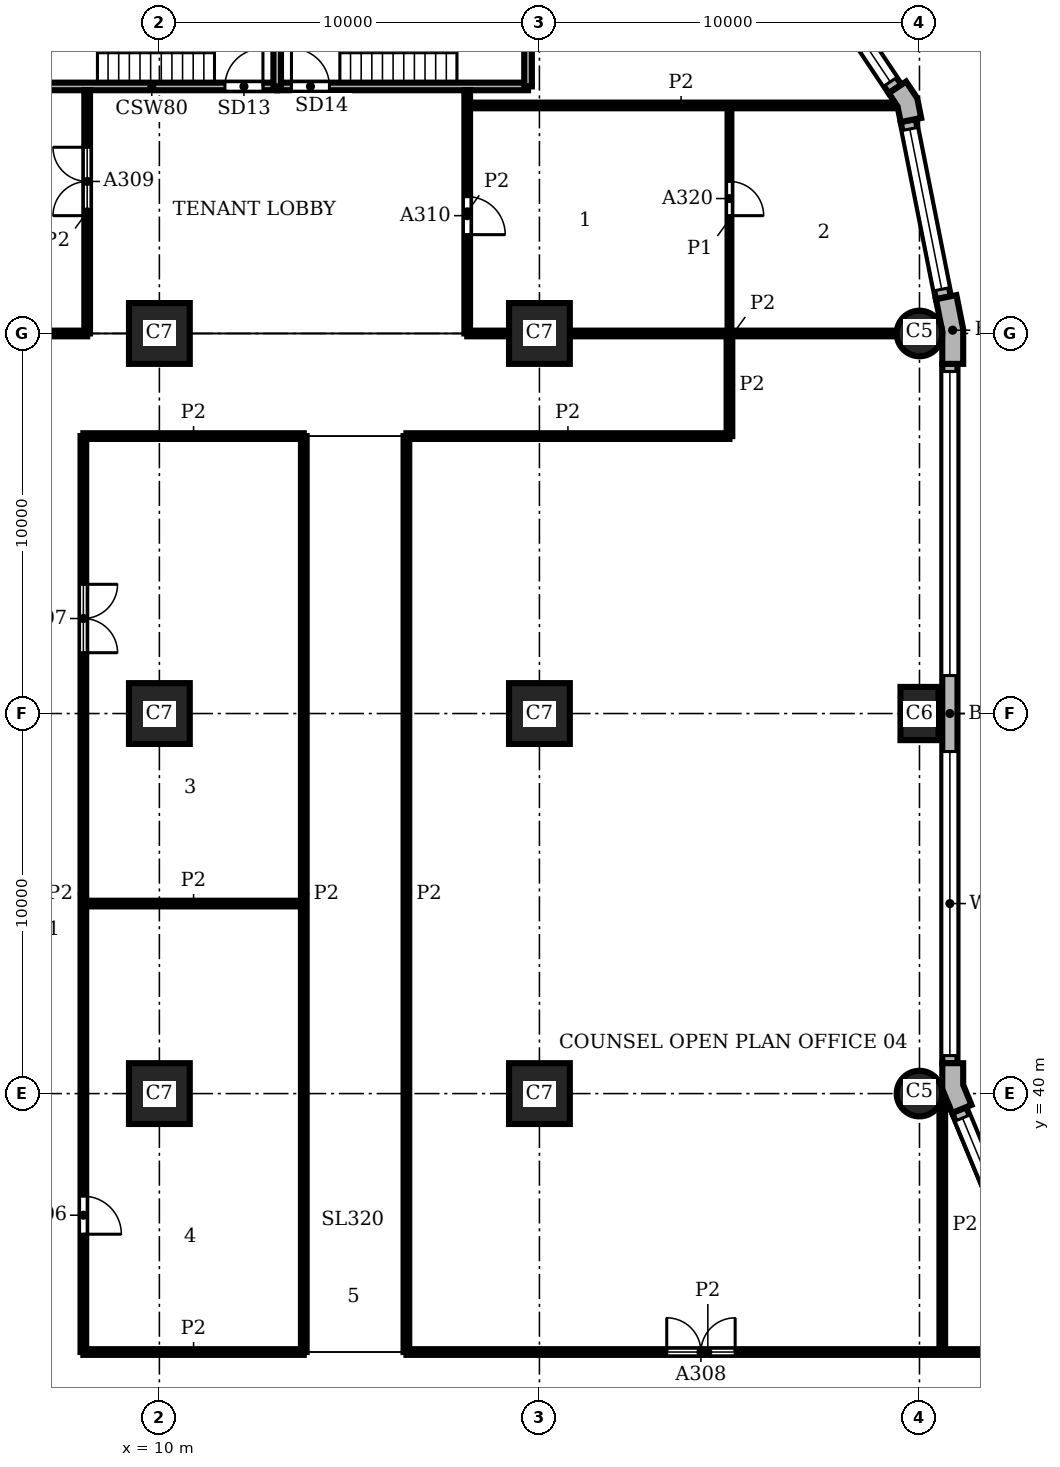
"""IFC4 building model, lengths in metres.
Left out: names, types, materials, properties, quantities, classifications, styles, units other than length and angle.
Written with IfcOpenShell. Run it as: python <this file> out.ifc"""

import sys

from ifc_helpers import new_model, si_unit, direction, frame, frame_2d, origin, origin_2d, place, context, subcontext, project, spatial, polyline, rectangle, circle, outline, extrude, element, fill, save


model = new_model("IFC4")
c1 = context("Model", 3, precision=1e-05, world=origin(), true_north=direction((0.0, 1.0)))
c2 = subcontext(c1, "Body", "Model", "MODEL_VIEW")
j1 = project(units=[si_unit("LENGTHUNIT", "METRE"), si_unit("PLANEANGLEUNIT", "RADIAN")], contexts=[c1])
p1 = place(None, origin())
s1 = spatial("IfcSite", under=j1, at=p1, CompositionType="ELEMENT")
p2 = place(p1, origin())
s2 = spatial("IfcBuilding", under=s1, at=p2, CompositionType="ELEMENT")
p3 = place(p2, frame((0.0, 0.0, 43.2)))
s3 = spatial("IfcBuildingStorey", under=s2, at=p3, CompositionType="ELEMENT", Elevation=43.2)
p4 = place(p3, frame((30.0, 40.0, 0.0), z_axis=(0.0, 0.0, 1.0), x_axis=(1.0, 0.0, 0.0)))
e1 = element("IfcColumn", 1, at=p4, inside=s3, PredefinedType="COLUMN", context=c2, shape_type="SweptSolid", body=[
    extrude(circle(Radius=0.6, at=origin_2d()), origin(), (0.0, 0.0, 1.0), 3.9),
])
p5 = place(p3, frame((30.0, 50.0, 0.0), z_axis=(0.0, 0.0, 1.0), x_axis=(0.0, 1.0, 0.0)))
e2 = element("IfcColumn", 2, at=p5, inside=s3, PredefinedType="COLUMN", context=c2, shape_type="SweptSolid", body=[
    extrude(rectangle(XDim=1.4, YDim=1.0, at=origin_2d()), origin(), (0.0, 0.0, 1.0), 3.9),
])
p6 = place(p3, frame((30.0, 60.0, 0.0), z_axis=(0.0, 0.0, 1.0), x_axis=(1.0, 0.0, 0.0)))
e3 = element("IfcColumn", 3, at=p6, inside=s3, PredefinedType="COLUMN", context=c2, shape_type="SweptSolid", body=[
    extrude(circle(Radius=0.6, at=origin_2d()), origin(), (0.0, 0.0, 1.0), 3.9),
])
for number, where, z_axis, x_axis in (
    (4, (10.0, 40.0, 0.0), (0.0, 0.0, 1.0), (1.0, 0.0, 0.0)),
    (5, (10.0, 50.0, 0.0), (0.0, 0.0, 1.0), (1.0, 0.0, 0.0)),
    (6, (10.0, 60.0, 0.0), (0.0, 0.0, 1.0), (1.0, 0.0, 0.0)),
    (7, (20.0, 40.0, 0.0), (0.0, 0.0, 1.0), (1.0, 0.0, 0.0)),
    (8, (20.0, 50.0, 0.0), (0.0, 0.0, 1.0), (1.0, 0.0, 0.0)),
    (9, (20.0, 60.0, 0.0), (0.0, 0.0, 1.0), (1.0, 0.0, 0.0)),
):
    element("IfcColumn", number, at=place(p3, frame(where, z_axis=z_axis, x_axis=x_axis)), inside=s3, PredefinedType="COLUMN", context=c2, shape_type="SweptSolid", body=[
        extrude(rectangle(XDim=1.6, YDim=1.6, at=origin_2d()), origin(), (0.0, 0.0, 1.0), 3.9),
    ])
p7 = place(p3, origin())
e10 = element("IfcWall", 10, at=p7, inside=s3, PredefinedType="SOLIDWALL", context=c2, shape_type="SweptSolid", body=[
    extrude(outline(polyline([(31.23, 39.644), (31.369, 39.701), (31.15, 40.229), (31.15, 40.8), (31.0, 40.8), (30.6, 40.8), (30.6, 40.119), (30.861, 39.49), (31.23, 39.644)])), origin(), (0.0, 0.0, 1.0), 3.9),
])
e11 = element("IfcWall", 11, at=p7, inside=s3, PredefinedType="SOLIDWALL", context=c2, shape_type="SweptSolid", body=[
    extrude(outline(polyline([(31.0, 59.2), (31.15, 59.2), (31.15, 60.113), (30.972, 61.009), (30.825, 60.98), (30.432, 60.902), (30.6, 60.059), (30.6, 59.2), (31.0, 59.2)])), origin(), (0.0, 0.0, 1.0), 3.9),
])
e12 = element("IfcWall", 12, at=p7, inside=s3, PredefinedType="SOLIDWALL", context=c2, shape_type="SweptSolid", body=[
    extrude(outline(polyline([(29.897, 65.641), (30.045, 65.67), (29.941, 66.189), (29.648, 66.629), (29.523, 66.545), (29.19, 66.323), (29.423, 65.974), (29.505, 65.563), (29.897, 65.641)])), origin(), (0.0, 0.0, 1.0), 3.9),
])
p8 = place(p3, frame((33.362, 33.974, 0.0), z_axis=(0.0, 0.0, 1.0), x_axis=(-0.382655745237, 0.923891000409, 0.0)))
e13 = element("IfcWall", 13, at=p8, inside=s3, PredefinedType="SOLIDWALL", context=c2, shape_type="SweptSolid", body=[
    extrude(rectangle(XDim=6.053, YDim=0.4, at=frame_2d((3.027, 0.0))), origin(), (0.0, 0.0, 1.0), 3.9),
])
p9 = place(p8, frame((0.227, 0.0, 0.9)))
e14 = element("IfcOpeningElement", 14, at=p9, cuts=e13, PredefinedType="OPENING", context=c2, shape_type="SweptSolid", body=[
    extrude(rectangle(XDim=5.6, YDim=2.35, at=frame_2d((2.8, 1.175))), frame((0.0, 0.21, 0.0), z_axis=(0.0, -1.0, 0.0), x_axis=(1.0, 0.0, 0.0)), (0.0, 0.0, 1.0), 0.42),
])
p10 = place(p3, frame((30.8, 40.8, 0.0), z_axis=(0.0, 0.0, 1.0), x_axis=(0.0, 1.0, 0.0)))
e15 = element("IfcWall", 15, at=p10, inside=s3, PredefinedType="SOLIDWALL", context=c2, shape_type="SweptSolid", body=[
    extrude(rectangle(XDim=18.4, YDim=0.4, at=frame_2d((9.2, 0.0))), origin(), (0.0, 0.0, 1.0), 3.9),
])
p11 = place(p10, frame((0.2, 0.0, 0.9)))
e16 = element("IfcOpeningElement", 16, at=p11, cuts=e15, PredefinedType="OPENING", context=c2, shape_type="SweptSolid", body=[
    extrude(rectangle(XDim=8.0, YDim=2.35, at=frame_2d((4.0, 1.175))), frame((0.0, 0.21, 0.0), z_axis=(0.0, -1.0, 0.0), x_axis=(1.0, 0.0, 0.0)), (0.0, 0.0, 1.0), 0.42),
])
p12 = place(p10, frame((10.2, 0.0, 0.9)))
e17 = element("IfcOpeningElement", 17, at=p12, cuts=e15, PredefinedType="OPENING", context=c2, shape_type="SweptSolid", body=[
    extrude(rectangle(XDim=8.0, YDim=2.35, at=frame_2d((4.0, 1.175))), frame((0.0, 0.21, 0.0), z_axis=(0.0, -1.0, 0.0), x_axis=(1.0, 0.0, 0.0)), (0.0, 0.0, 1.0), 0.42),
])
p13 = place(p3, frame((30.629, 60.941, 0.0), z_axis=(0.0, 0.0, 1.0), x_axis=(-0.195098533057, 0.98078364709, 0.0)))
e18 = element("IfcWall", 18, at=p13, inside=s3, PredefinedType="SOLIDWALL", context=c2, shape_type="SweptSolid", body=[
    extrude(rectangle(XDim=4.753, YDim=0.4, at=frame_2d((2.376, 0.0))), origin(), (0.0, 0.0, 1.0), 3.9),
])
p14 = place(p13, frame((0.226, 0.0, 0.9)))
e19 = element("IfcOpeningElement", 19, at=p14, cuts=e18, PredefinedType="OPENING", context=c2, shape_type="SweptSolid", body=[
    extrude(rectangle(XDim=4.3, YDim=2.35, at=frame_2d((2.15, 1.175))), frame((0.0, 0.21, 0.0), z_axis=(0.0, -1.0, 0.0), x_axis=(1.0, 0.0, 0.0)), (0.0, 0.0, 1.0), 0.42),
])
p15 = place(p3, frame((29.357, 66.434, 0.0), z_axis=(0.0, 0.0, 1.0), x_axis=(-0.555541552266, 0.831488775454, 0.0)))
e20 = element("IfcWall", 20, at=p15, inside=s3, PredefinedType="SOLIDWALL", context=c2, shape_type="SweptSolid", body=[
    extrude(rectangle(XDim=4.753, YDim=0.4, at=frame_2d((2.376, 0.0))), origin(), (0.0, 0.0, 1.0), 3.9),
])
p16 = place(p15, frame((0.226, 0.0, 0.9)))
e21 = element("IfcOpeningElement", 21, at=p16, cuts=e20, PredefinedType="OPENING", context=c2, shape_type="SweptSolid", body=[
    extrude(rectangle(XDim=4.3, YDim=2.35, at=frame_2d((2.15, 1.175))), frame((0.0, 0.21, 0.0), z_axis=(0.0, -1.0, 0.0), x_axis=(1.0, 0.0, 0.0)), (0.0, 0.0, 1.0), 0.42),
])
p17 = place(p3, frame((6.5, 66.5, 0.0), z_axis=(0.0, 0.0, 1.0), x_axis=(1.0, 0.0, 0.0)))
e22 = element("IfcWall", 22, at=p17, inside=s3, PredefinedType="SHEAR", context=c2, shape_type="SweptSolid", body=[
    extrude(rectangle(XDim=6.6, YDim=0.2, at=frame_2d((3.3, 0.0))), origin(), (0.0, 0.0, 1.0), 3.58),
])
p18 = place(p17, frame((5.225, 0.0, 0.0)))
e23 = element("IfcOpeningElement", 23, at=p18, cuts=e22, PredefinedType="OPENING", context=c2, shape_type="SweptSolid", body=[
    extrude(rectangle(XDim=1.0, YDim=2.1, at=frame_2d((0.5, 1.05))), frame((0.0, 0.11, 0.0), z_axis=(0.0, -1.0, 0.0), x_axis=(1.0, 0.0, 0.0)), (0.0, 0.0, 1.0), 0.22),
])
p19 = place(p3, frame((13.1, 66.5, 0.0), z_axis=(0.0, 0.0, 1.0), x_axis=(1.0, 0.0, 0.0)))
e24 = element("IfcWall", 24, at=p19, inside=s3, PredefinedType="SHEAR", context=c2, shape_type="SweptSolid", body=[
    extrude(rectangle(XDim=6.6, YDim=0.2, at=frame_2d((3.3, 0.0))), origin(), (0.0, 0.0, 1.0), 3.58),
])
p20 = place(p19, frame((0.375, 0.0, 0.0)))
e25 = element("IfcOpeningElement", 25, at=p20, cuts=e24, PredefinedType="OPENING", context=c2, shape_type="SweptSolid", body=[
    extrude(rectangle(XDim=1.0, YDim=2.1, at=frame_2d((0.5, 1.05))), frame((0.0, 0.11, 0.0), z_axis=(0.0, -1.0, 0.0), x_axis=(1.0, 0.0, 0.0)), (0.0, 0.0, 1.0), 0.22),
])
for number, where, z_axis, x_axis in (
    (26, (13.1, 66.5, 0.0), (0.0, 0.0, 1.0), (0.0, 1.0, 0.0)),
    (27, (19.7, 66.5, 0.0), (0.0, 0.0, 1.0), (0.0, 1.0, 0.0)),
):
    element("IfcWall", number, at=place(p3, frame(where, z_axis=z_axis, x_axis=x_axis)), inside=s3, PredefinedType="SHEAR", context=c2, shape_type="SweptSolid", body=[
        extrude(rectangle(XDim=3.3, YDim=0.2, at=frame_2d((1.65, 0.0))), origin(), (0.0, 0.0, 1.0), 3.58),
    ])
p21 = place(p3, frame((25.0, 60.0, 0.0), z_axis=(0.0, 0.0, 1.0), x_axis=(0.0, 1.0, 0.0)))
e28 = element("IfcWall", 28, at=p21, inside=s3, PredefinedType="PARTITIONING", context=c2, shape_type="SweptSolid", body=[
    extrude(rectangle(XDim=6.0, YDim=0.1, at=frame_2d((3.0, 0.0))), origin(), (0.0, 0.0, 1.0), 3.58),
])
p22 = place(p21, frame((3.1, 0.0, 0.0)))
e29 = element("IfcOpeningElement", 29, at=p22, cuts=e28, PredefinedType="OPENING", context=c2, shape_type="SweptSolid", body=[
    extrude(rectangle(XDim=0.9, YDim=2.1, at=frame_2d((0.45, 1.05))), frame((0.0, 0.06, 0.0), z_axis=(0.0, -1.0, 0.0), x_axis=(1.0, 0.0, 0.0)), (0.0, 0.0, 1.0), 0.12),
])
p23 = place(p3, frame((8.0, 33.2, 0.0), z_axis=(0.0, 0.0, 1.0), x_axis=(0.0, 1.0, 0.0)))
e30 = element("IfcWall", 30, at=p23, inside=s3, PredefinedType="PARTITIONING", context=c2, shape_type="SweptSolid", body=[
    extrude(rectangle(XDim=24.1, YDim=0.15, at=frame_2d((12.05, 0.0))), origin(), (0.0, 0.0, 1.0), 3.58),
])
p24 = place(p23, frame((3.1, 0.0, 0.0)))
e31 = element("IfcOpeningElement", 31, at=p24, cuts=e30, PredefinedType="OPENING", context=c2, shape_type="SweptSolid", body=[
    extrude(rectangle(XDim=1.0, YDim=2.1, at=frame_2d((0.5, 1.05))), frame((0.0, 0.085, 0.0), z_axis=(0.0, -1.0, 0.0), x_axis=(1.0, 0.0, 0.0)), (0.0, 0.0, 1.0), 0.17),
])
p25 = place(p23, frame((18.4, 0.0, 0.0)))
e32 = element("IfcOpeningElement", 32, at=p25, cuts=e30, PredefinedType="OPENING", context=c2, shape_type="SweptSolid", body=[
    extrude(rectangle(XDim=1.8, YDim=2.1, at=frame_2d((0.9, 1.05))), frame((0.0, 0.085, 0.0), z_axis=(0.0, -1.0, 0.0), x_axis=(1.0, 0.0, 0.0)), (0.0, 0.0, 1.0), 0.17),
])
p26 = place(p3, frame((8.1, 60.0, 0.0), z_axis=(0.0, 0.0, 1.0), x_axis=(0.0, 1.0, 0.0)))
e33 = element("IfcWall", 33, at=p26, inside=s3, PredefinedType="PARTITIONING", context=c2, shape_type="SweptSolid", body=[
    extrude(rectangle(XDim=6.4, YDim=0.15, at=frame_2d((3.2, 0.0))), origin(), (0.0, 0.0, 1.0), 3.58),
])
p27 = place(p26, frame((3.1, 0.0, 0.0)))
e34 = element("IfcOpeningElement", 34, at=p27, cuts=e33, PredefinedType="OPENING", context=c2, shape_type="SweptSolid", body=[
    extrude(rectangle(XDim=1.8, YDim=2.1, at=frame_2d((0.9, 1.05))), frame((0.0, 0.085, 0.0), z_axis=(0.0, -1.0, 0.0), x_axis=(1.0, 0.0, 0.0)), (0.0, 0.0, 1.0), 0.17),
])
for number, where, z_axis, x_axis in (
    (35, (13.8, 33.2, 0.0), (0.0, 0.0, 1.0), (0.0, 1.0, 0.0)),
    (36, (16.5, 33.2, 0.0), (0.0, 0.0, 1.0), (0.0, 1.0, 0.0)),
):
    element("IfcWall", number, at=place(p3, frame(where, z_axis=z_axis, x_axis=x_axis)), inside=s3, PredefinedType="PARTITIONING", context=c2, shape_type="SweptSolid", body=[
        extrude(rectangle(XDim=24.1, YDim=0.15, at=frame_2d((12.05, 0.0))), origin(), (0.0, 0.0, 1.0), 3.58),
    ])
p28 = place(p3, frame((18.1, 60.0, 0.0), z_axis=(0.0, 0.0, 1.0), x_axis=(0.0, 1.0, 0.0)))
e37 = element("IfcWall", 37, at=p28, inside=s3, PredefinedType="PARTITIONING", context=c2, shape_type="SweptSolid", body=[
    extrude(rectangle(XDim=6.4, YDim=0.15, at=frame_2d((3.2, 0.0))), origin(), (0.0, 0.0, 1.0), 3.58),
])
p29 = place(p28, frame((2.6, 0.0, 0.0)))
e38 = element("IfcOpeningElement", 38, at=p29, cuts=e37, PredefinedType="OPENING", context=c2, shape_type="SweptSolid", body=[
    extrude(rectangle(XDim=1.0, YDim=2.1, at=frame_2d((0.5, 1.05))), frame((0.0, 0.085, 0.0), z_axis=(0.0, -1.0, 0.0), x_axis=(1.0, 0.0, 0.0)), (0.0, 0.0, 1.0), 0.17),
])
p30 = place(p3, frame((25.0, 57.3, 0.0), z_axis=(0.0, 0.0, 1.0), x_axis=(0.0, 1.0, 0.0)))
e39 = element("IfcWall", 39, at=p30, inside=s3, PredefinedType="PARTITIONING", context=c2, shape_type="SweptSolid", body=[
    extrude(rectangle(XDim=2.7, YDim=0.15, at=frame_2d((1.35, 0.0))), origin(), (0.0, 0.0, 1.0), 3.58),
])
p31 = place(p3, frame((30.6, 33.2, 0.0), z_axis=(0.0, 0.0, 1.0), x_axis=(0.0, 1.0, 0.0)))
e40 = element("IfcWall", 40, at=p31, inside=s3, PredefinedType="PARTITIONING", context=c2, shape_type="SweptSolid", body=[
    extrude(rectangle(XDim=6.699, YDim=0.15, at=frame_2d((3.35, 0.0))), origin(), (0.0, 0.0, 1.0), 3.58),
])
p32 = place(p3, frame((8.0, 33.2, 0.0), z_axis=(0.0, 0.0, 1.0), x_axis=(1.0, 0.0, 0.0)))
e41 = element("IfcWall", 41, at=p32, inside=s3, PredefinedType="PARTITIONING", context=c2, shape_type="SweptSolid", body=[
    extrude(rectangle(XDim=5.8, YDim=0.15, at=frame_2d((2.9, 0.0))), origin(), (0.0, 0.0, 1.0), 3.58),
])
p33 = place(p3, frame((16.5, 33.2, 0.0), z_axis=(0.0, 0.0, 1.0), x_axis=(1.0, 0.0, 0.0)))
e42 = element("IfcWall", 42, at=p33, inside=s3, PredefinedType="PARTITIONING", context=c2, shape_type="SweptSolid", body=[
    extrude(rectangle(XDim=15.862, YDim=0.15, at=frame_2d((7.931, 0.0))), origin(), (0.0, 0.0, 1.0), 3.58),
])
p34 = place(p33, frame((6.85, 0.0, 0.0)))
e43 = element("IfcOpeningElement", 43, at=p34, cuts=e42, PredefinedType="OPENING", context=c2, shape_type="SweptSolid", body=[
    extrude(rectangle(XDim=1.8, YDim=2.1, at=frame_2d((0.9, 1.05))), frame((0.0, 0.085, 0.0), z_axis=(0.0, -1.0, 0.0), x_axis=(1.0, 0.0, 0.0)), (0.0, 0.0, 1.0), 0.17),
])
for number, where, z_axis, x_axis in (
    (44, (8.0, 45.0, 0.0), (0.0, 0.0, 1.0), (1.0, 0.0, 0.0)),
    (45, (8.0, 57.3, 0.0), (0.0, 0.0, 1.0), (1.0, 0.0, 0.0)),
):
    element("IfcWall", number, at=place(p3, frame(where, z_axis=z_axis, x_axis=x_axis)), inside=s3, PredefinedType="PARTITIONING", context=c2, shape_type="SweptSolid", body=[
        extrude(rectangle(XDim=5.8, YDim=0.15, at=frame_2d((2.9, 0.0))), origin(), (0.0, 0.0, 1.0), 3.58),
    ])
p35 = place(p3, frame((16.5, 57.3, 0.0), z_axis=(0.0, 0.0, 1.0), x_axis=(1.0, 0.0, 0.0)))
e46 = element("IfcWall", 46, at=p35, inside=s3, PredefinedType="PARTITIONING", context=c2, shape_type="SweptSolid", body=[
    extrude(rectangle(XDim=8.5, YDim=0.15, at=frame_2d((4.25, 0.0))), origin(), (0.0, 0.0, 1.0), 3.58),
])
p36 = place(p3, frame((0.6, 60.0, 0.0), z_axis=(0.0, 0.0, 1.0), x_axis=(1.0, 0.0, 0.0)))
e47 = element("IfcWall", 47, at=p36, inside=s3, PredefinedType="PARTITIONING", context=c2, shape_type="SweptSolid", body=[
    extrude(rectangle(XDim=7.5, YDim=0.15, at=frame_2d((3.75, 0.0))), origin(), (0.0, 0.0, 1.0), 3.58),
])
p37 = place(p3, frame((18.1, 60.0, 0.0), z_axis=(0.0, 0.0, 1.0), x_axis=(1.0, 0.0, 0.0)))
e48 = element("IfcWall", 48, at=p37, inside=s3, PredefinedType="PARTITIONING", context=c2, shape_type="SweptSolid", body=[
    extrude(rectangle(XDim=1.1, YDim=0.15, at=frame_2d((0.55, 0.0))), origin(), (0.0, 0.0, 1.0), 3.58),
])
p38 = place(p3, frame((20.8, 60.0, 0.0), z_axis=(0.0, 0.0, 1.0), x_axis=(1.0, 0.0, 0.0)))
e49 = element("IfcWall", 49, at=p38, inside=s3, PredefinedType="PARTITIONING", context=c2, shape_type="SweptSolid", body=[
    extrude(rectangle(XDim=8.6, YDim=0.15, at=frame_2d((4.3, 0.0))), origin(), (0.0, 0.0, 1.0), 3.58),
])
p39 = place(p3, frame((18.1, 66.0, 0.0), z_axis=(0.0, 0.0, 1.0), x_axis=(1.0, 0.0, 0.0)))
e50 = element("IfcWall", 50, at=p39, inside=s3, PredefinedType="PARTITIONING", context=c2, shape_type="SweptSolid", body=[
    extrude(rectangle(XDim=11.256, YDim=0.15, at=frame_2d((5.628, 0.0))), origin(), (0.0, 0.0, 1.0), 3.58),
])
p40 = place(p9, origin())
e51 = element("IfcWindow", 51, at=p40, inside=s3, PartitioningType="SINGLE_PANEL", PredefinedType="WINDOW", context=c2, shape_type="SweptSolid", body=[
    extrude(rectangle(XDim=5.6, YDim=2.35, at=frame_2d((2.8, 1.175))), frame((0.0, 0.16, 0.0), z_axis=(0.0, -1.0, 0.0), x_axis=(1.0, 0.0, 0.0)), (0.0, 0.0, 1.0), 0.06),
])
fill(e14, e51)
p41 = place(p11, origin())
e52 = element("IfcWindow", 52, at=p41, inside=s3, PartitioningType="SINGLE_PANEL", PredefinedType="WINDOW", context=c2, shape_type="SweptSolid", body=[
    extrude(rectangle(XDim=8.0, YDim=2.35, at=frame_2d((4.0, 1.175))), frame((0.0, 0.16, 0.0), z_axis=(0.0, -1.0, 0.0), x_axis=(1.0, 0.0, 0.0)), (0.0, 0.0, 1.0), 0.06),
])
fill(e16, e52)
p42 = place(p12, origin())
e53 = element("IfcWindow", 53, at=p42, inside=s3, PartitioningType="SINGLE_PANEL", PredefinedType="WINDOW", context=c2, shape_type="SweptSolid", body=[
    extrude(rectangle(XDim=8.0, YDim=2.35, at=frame_2d((4.0, 1.175))), frame((0.0, 0.16, 0.0), z_axis=(0.0, -1.0, 0.0), x_axis=(1.0, 0.0, 0.0)), (0.0, 0.0, 1.0), 0.06),
])
fill(e17, e53)
p43 = place(p14, origin())
e54 = element("IfcWindow", 54, at=p43, inside=s3, PartitioningType="SINGLE_PANEL", PredefinedType="WINDOW", context=c2, shape_type="SweptSolid", body=[
    extrude(rectangle(XDim=4.3, YDim=2.35, at=frame_2d((2.15, 1.175))), frame((0.0, 0.16, 0.0), z_axis=(0.0, -1.0, 0.0), x_axis=(1.0, 0.0, 0.0)), (0.0, 0.0, 1.0), 0.06),
])
fill(e19, e54)
p44 = place(p16, origin())
e55 = element("IfcWindow", 55, at=p44, inside=s3, PartitioningType="SINGLE_PANEL", PredefinedType="WINDOW", context=c2, shape_type="SweptSolid", body=[
    extrude(rectangle(XDim=4.3, YDim=2.35, at=frame_2d((2.15, 1.175))), frame((0.0, 0.16, 0.0), z_axis=(0.0, -1.0, 0.0), x_axis=(1.0, 0.0, 0.0)), (0.0, 0.0, 1.0), 0.06),
])
fill(e21, e55)
p45 = place(p18, origin())
e56 = element("IfcDoor", 56, at=p45, inside=s3, OperationType="SINGLE_SWING_RIGHT", PredefinedType="DOOR", context=c2, shape_type="SweptSolid", body=[
    extrude(rectangle(XDim=1.0, YDim=2.1, at=frame_2d((0.5, 1.05))), frame((0.0, 0.025, 0.0), z_axis=(0.0, -1.0, 0.0), x_axis=(1.0, 0.0, 0.0)), (0.0, 0.0, 1.0), 0.05),
])
fill(e23, e56)
p46 = place(p20, origin())
e57 = element("IfcDoor", 57, at=p46, inside=s3, OperationType="SINGLE_SWING_LEFT", PredefinedType="DOOR", context=c2, shape_type="SweptSolid", body=[
    extrude(rectangle(XDim=1.0, YDim=2.1, at=frame_2d((0.5, 1.05))), frame((0.0, 0.025, 0.0), z_axis=(0.0, -1.0, 0.0), x_axis=(1.0, 0.0, 0.0)), (0.0, 0.0, 1.0), 0.05),
])
fill(e25, e57)
p47 = place(p24, frame((1.0, 0.0, 0.0), z_axis=(0.0, 0.0, 1.0), x_axis=(-1.0, 0.0, 0.0)))
e58 = element("IfcDoor", 58, at=p47, inside=s3, OperationType="SINGLE_SWING_RIGHT", PredefinedType="DOOR", context=c2, shape_type="SweptSolid", body=[
    extrude(rectangle(XDim=1.0, YDim=2.1, at=frame_2d((0.5, 1.05))), frame((0.0, 0.025, 0.0), z_axis=(0.0, -1.0, 0.0), x_axis=(1.0, 0.0, 0.0)), (0.0, 0.0, 1.0), 0.05),
])
fill(e31, e58)
p48 = place(p25, frame((1.8, 0.0, 0.0), z_axis=(0.0, 0.0, 1.0), x_axis=(-1.0, 0.0, 0.0)))
e59 = element("IfcDoor", 59, at=p48, inside=s3, OperationType="DOUBLE_DOOR_SINGLE_SWING", PredefinedType="DOOR", context=c2, shape_type="SweptSolid", body=[
    extrude(rectangle(XDim=1.8, YDim=2.1, at=frame_2d((0.9, 1.05))), frame((0.0, 0.025, 0.0), z_axis=(0.0, -1.0, 0.0), x_axis=(1.0, 0.0, 0.0)), (0.0, 0.0, 1.0), 0.05),
])
fill(e32, e59)
p49 = place(p34, origin())
e60 = element("IfcDoor", 60, at=p49, inside=s3, OperationType="DOUBLE_DOOR_SINGLE_SWING", PredefinedType="DOOR", context=c2, shape_type="SweptSolid", body=[
    extrude(rectangle(XDim=1.8, YDim=2.1, at=frame_2d((0.9, 1.05))), frame((0.0, 0.025, 0.0), z_axis=(0.0, -1.0, 0.0), x_axis=(1.0, 0.0, 0.0)), (0.0, 0.0, 1.0), 0.05),
])
fill(e43, e60)
p50 = place(p27, origin())
e61 = element("IfcDoor", 61, at=p50, inside=s3, OperationType="DOUBLE_DOOR_SINGLE_SWING", PredefinedType="DOOR", context=c2, shape_type="SweptSolid", body=[
    extrude(rectangle(XDim=1.8, YDim=2.1, at=frame_2d((0.9, 1.05))), frame((0.0, 0.025, 0.0), z_axis=(0.0, -1.0, 0.0), x_axis=(1.0, 0.0, 0.0)), (0.0, 0.0, 1.0), 0.05),
])
fill(e34, e61)
p51 = place(p29, frame((1.0, 0.0, 0.0), z_axis=(0.0, 0.0, 1.0), x_axis=(-1.0, 0.0, 0.0)))
e62 = element("IfcDoor", 62, at=p51, inside=s3, OperationType="SINGLE_SWING_RIGHT", PredefinedType="DOOR", context=c2, shape_type="SweptSolid", body=[
    extrude(rectangle(XDim=1.0, YDim=2.1, at=frame_2d((0.5, 1.05))), frame((0.0, 0.025, 0.0), z_axis=(0.0, -1.0, 0.0), x_axis=(1.0, 0.0, 0.0)), (0.0, 0.0, 1.0), 0.05),
])
fill(e38, e62)
p52 = place(p22, frame((0.9, 0.0, 0.0), z_axis=(0.0, 0.0, 1.0), x_axis=(-1.0, 0.0, 0.0)))
e63 = element("IfcDoor", 63, at=p52, inside=s3, OperationType="SINGLE_SWING_RIGHT", PredefinedType="DOOR", context=c2, shape_type="SweptSolid", body=[
    extrude(rectangle(XDim=0.9, YDim=2.1, at=frame_2d((0.45, 1.05))), frame((0.0, 0.025, 0.0), z_axis=(0.0, -1.0, 0.0), x_axis=(1.0, 0.0, 0.0)), (0.0, 0.0, 1.0), 0.05),
])
fill(e29, e63)
save(model, sys.argv[1])
